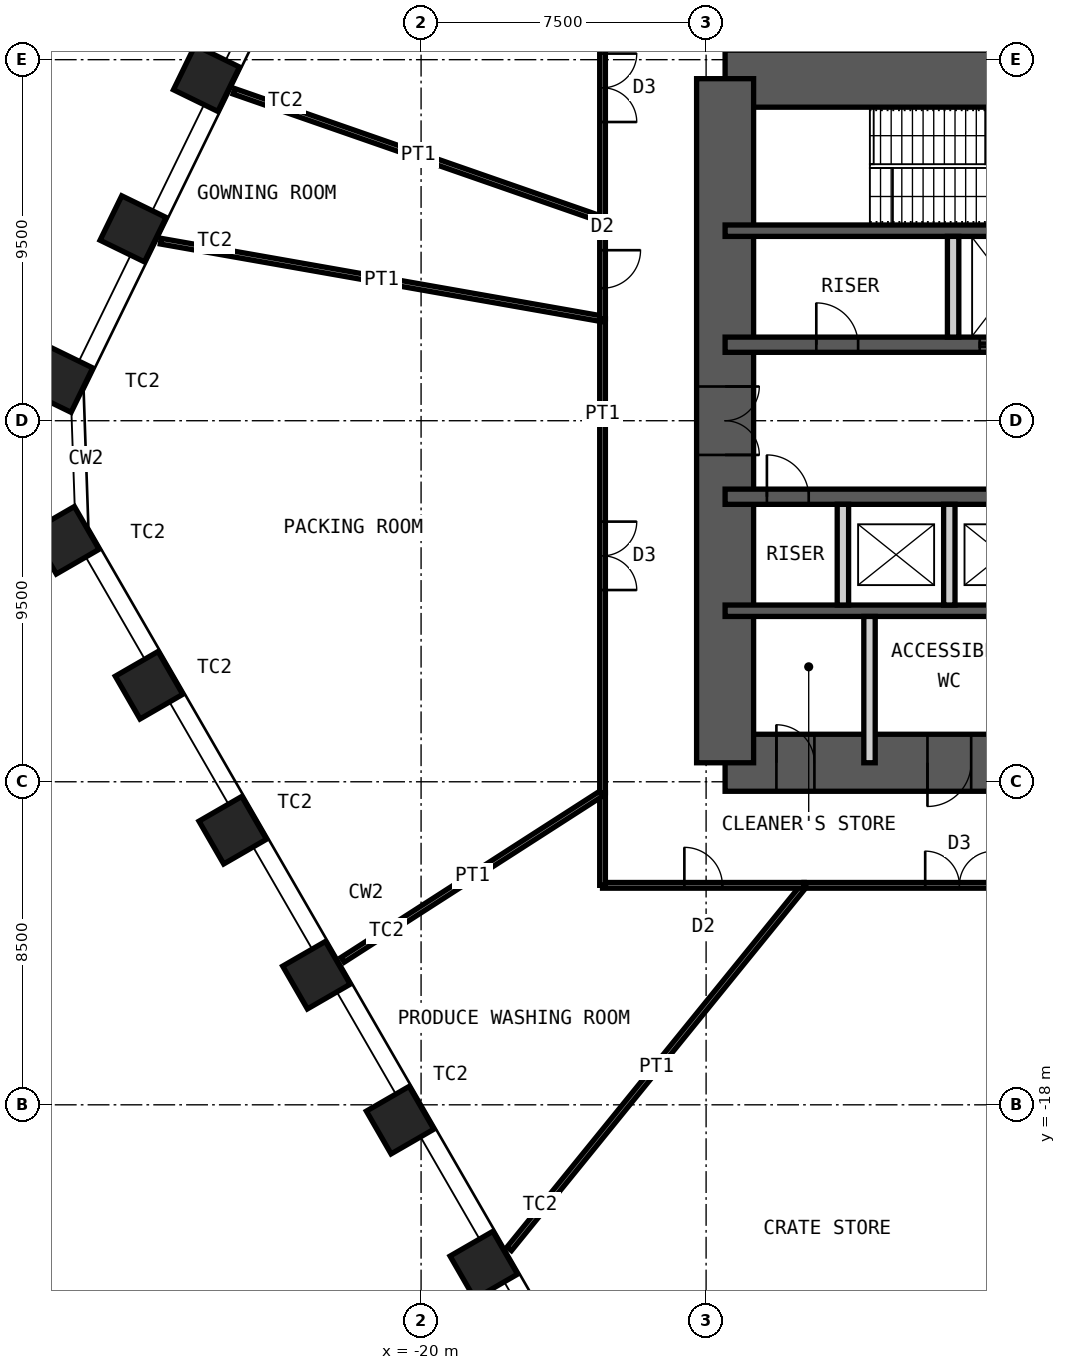
"""IFC4 building model, lengths in metres.
Left out: names, types, materials, properties, quantities, classifications, styles, units other than length and angle.
Written with IfcOpenShell. Run it as: python <this file> out.ifc"""

import sys

from ifc_helpers import new_model, si_unit, direction, frame, frame_2d, origin, origin_2d, place, context, subcontext, project, spatial, rectangle, hollow_rectangle, extrude, element, fill, save


model = new_model("IFC4")
c1 = context("Model", 3, precision=1e-05, world=origin(), true_north=direction((0.0, 1.0)))
c2 = subcontext(c1, "Body", "Model", "MODEL_VIEW")
j1 = project(units=[si_unit("LENGTHUNIT", "METRE"), si_unit("PLANEANGLEUNIT", "RADIAN")], contexts=[c1])
p1 = place(None, origin())
s1 = spatial("IfcSite", under=j1, at=p1, CompositionType="ELEMENT")
p2 = place(p1, origin())
s2 = spatial("IfcBuilding", under=s1, at=p2, CompositionType="ELEMENT")
p3 = place(p2, frame((0.0, 0.0, 87.0)))
s3 = spatial("IfcBuildingStorey", under=s2, at=p3, CompositionType="ELEMENT", Elevation=87.0)
for number, where, z_axis, x_axis in (
    (1, (-18.349, -22.218, 0.0), (0.0, 0.0, 1.0), (0.5, -0.866, 0.0)),
    (2, (-20.552, -18.404, 0.0), (0.0, 0.0, 1.0), (0.5, -0.866, 0.0)),
    (3, (-22.754, -14.589, 0.0), (0.0, 0.0, 1.0), (0.5, -0.866, 0.0)),
    (4, (-24.956, -10.775, 0.0), (0.0, 0.0, 1.0), (0.5, -0.866, 0.0)),
    (5, (-27.158, -6.96, 0.0), (0.0, 0.0, 1.0), (0.5, -0.866, 0.0)),
    (6, (-29.361, -3.146, 0.0), (0.0, 0.0, 1.0), (0.5, -0.866, 0.0)),
    (7, (-29.509, 1.09, 0.0), (0.0, 0.0, 1.0), (-0.438, -0.899, 0.0)),
    (8, (-27.578, 5.049, 0.0), (0.0, 0.0, 1.0), (-0.438, -0.899, 0.0)),
    (9, (-25.647, 9.008, 0.0), (0.0, 0.0, 1.0), (-0.438, -0.899, 0.0)),
):
    element("IfcColumn", number, at=place(p3, frame(where, z_axis=z_axis, x_axis=x_axis)), inside=s3, PredefinedType="COLUMN", context=c2, shape_type="SweptSolid", body=[
        extrude(hollow_rectangle(XDim=1.3, YDim=1.3, WallThickness=0.1, at=origin_2d()), origin(), (0.0, 0.0, 1.0), 5.0),
    ])
p4 = place(p3, frame((-12.0, 9.0, 0.0), z_axis=(0.0, 0.0, 1.0), x_axis=(1.0, 0.0, 0.0)))
e10 = element("IfcWall", 10, at=p4, inside=s3, PredefinedType="SHEAR", context=c2, shape_type="SweptSolid", body=[
    extrude(rectangle(XDim=24.0, YDim=1.5, at=frame_2d((12.0, 0.0))), origin(), (0.0, 0.0, 1.0), 5.0),
])
p5 = place(p4, frame((10.4, 0.0, 0.0)))
e11 = element("IfcOpeningElement", 11, at=p5, cuts=e10, PredefinedType="OPENING", context=c2, shape_type="SweptSolid", body=[
    extrude(rectangle(XDim=1.0, YDim=2.1, at=frame_2d((0.5, 1.05))), frame((0.0, 0.76, 0.0), z_axis=(0.0, -1.0, 0.0), x_axis=(1.0, 0.0, 0.0)), (0.0, 0.0, 1.0), 1.52),
])
p6 = place(p4, frame((17.6, 0.0, 0.0)))
e12 = element("IfcOpeningElement", 12, at=p6, cuts=e10, PredefinedType="OPENING", context=c2, shape_type="SweptSolid", body=[
    extrude(rectangle(XDim=0.9, YDim=2.1, at=frame_2d((0.45, 1.05))), frame((0.0, 0.76, 0.0), z_axis=(0.0, -1.0, 0.0), x_axis=(1.0, 0.0, 0.0)), (0.0, 0.0, 1.0), 1.52),
])
p7 = place(p4, frame((21.9, 0.0, 0.0)))
e13 = element("IfcOpeningElement", 13, at=p7, cuts=e10, PredefinedType="OPENING", context=c2, shape_type="SweptSolid", body=[
    extrude(rectangle(XDim=0.9, YDim=2.1, at=frame_2d((0.45, 1.05))), frame((0.0, 0.76, 0.0), z_axis=(0.0, -1.0, 0.0), x_axis=(1.0, 0.0, 0.0)), (0.0, 0.0, 1.0), 1.52),
])
p8 = place(p3, frame((-12.0, -9.0, 0.0), z_axis=(0.0, 0.0, 1.0), x_axis=(1.0, 0.0, 0.0)))
e14 = element("IfcWall", 14, at=p8, inside=s3, PredefinedType="SHEAR", context=c2, shape_type="SweptSolid", body=[
    extrude(rectangle(XDim=24.0, YDim=1.5, at=frame_2d((12.0, 0.0))), origin(), (0.0, 0.0, 1.0), 5.0),
])
p9 = place(p8, frame((1.35, 0.0, 0.0)))
e15 = element("IfcOpeningElement", 15, at=p9, cuts=e14, PredefinedType="OPENING", context=c2, shape_type="SweptSolid", body=[
    extrude(rectangle(XDim=1.0, YDim=2.1, at=frame_2d((0.5, 1.05))), frame((0.0, 0.76, 0.0), z_axis=(0.0, -1.0, 0.0), x_axis=(1.0, 0.0, 0.0)), (0.0, 0.0, 1.0), 1.52),
])
p10 = place(p8, frame((5.325, 0.0, 0.0)))
e16 = element("IfcOpeningElement", 16, at=p10, cuts=e14, PredefinedType="OPENING", context=c2, shape_type="SweptSolid", body=[
    extrude(rectangle(XDim=1.15, YDim=2.1, at=frame_2d((0.575, 1.05))), frame((0.0, 0.76, 0.0), z_axis=(0.0, -1.0, 0.0), x_axis=(1.0, 0.0, 0.0)), (0.0, 0.0, 1.0), 1.52),
])
p11 = place(p8, frame((12.6, 0.0, 0.0)))
e17 = element("IfcOpeningElement", 17, at=p11, cuts=e14, PredefinedType="OPENING", context=c2, shape_type="SweptSolid", body=[
    extrude(rectangle(XDim=1.0, YDim=2.1, at=frame_2d((0.5, 1.05))), frame((0.0, 0.76, 0.0), z_axis=(0.0, -1.0, 0.0), x_axis=(1.0, 0.0, 0.0)), (0.0, 0.0, 1.0), 1.52),
])
p12 = place(p3, frame((-12.0, -9.0, 0.0), z_axis=(0.0, 0.0, 1.0), x_axis=(0.0, 1.0, 0.0)))
e18 = element("IfcWall", 18, at=p12, inside=s3, PredefinedType="SHEAR", context=c2, shape_type="SweptSolid", body=[
    extrude(rectangle(XDim=18.0, YDim=1.5, at=frame_2d((9.0, 0.0))), origin(), (0.0, 0.0, 1.0), 5.0),
])
p13 = place(p12, frame((8.1, 0.0, 0.0)))
e19 = element("IfcOpeningElement", 19, at=p13, cuts=e18, PredefinedType="OPENING", context=c2, shape_type="SweptSolid", body=[
    extrude(rectangle(XDim=1.8, YDim=2.1, at=frame_2d((0.9, 1.05))), frame((0.0, 0.76, 0.0), z_axis=(0.0, -1.0, 0.0), x_axis=(1.0, 0.0, 0.0)), (0.0, 0.0, 1.0), 1.52),
])
p14 = place(p3, frame((-12.0, 5.0, 0.0), z_axis=(0.0, 0.0, 1.0), x_axis=(1.0, 0.0, 0.0)))
e20 = element("IfcWall", 20, at=p14, inside=s3, PredefinedType="SHEAR", context=c2, shape_type="SweptSolid", body=[
    extrude(rectangle(XDim=24.0, YDim=0.3, at=frame_2d((12.0, 0.0))), origin(), (0.0, 0.0, 1.0), 5.0),
])
p15 = place(p3, frame((-12.0, 2.0, 0.0), z_axis=(0.0, 0.0, 1.0), x_axis=(1.0, 0.0, 0.0)))
e21 = element("IfcWall", 21, at=p15, inside=s3, PredefinedType="SHEAR", context=c2, shape_type="SweptSolid", body=[
    extrude(rectangle(XDim=24.0, YDim=0.4, at=frame_2d((12.0, 0.0))), origin(), (0.0, 0.0, 1.0), 5.0),
])
p16 = place(p15, frame((2.4, 0.0, 0.0)))
e22 = element("IfcOpeningElement", 22, at=p16, cuts=e21, PredefinedType="OPENING", context=c2, shape_type="SweptSolid", body=[
    extrude(rectangle(XDim=1.1, YDim=2.1, at=frame_2d((0.55, 1.05))), frame((0.0, 0.21, 0.0), z_axis=(0.0, -1.0, 0.0), x_axis=(1.0, 0.0, 0.0)), (0.0, 0.0, 1.0), 0.42),
])
p17 = place(p15, frame((22.0, 0.0, 0.0)))
e23 = element("IfcOpeningElement", 23, at=p17, cuts=e21, PredefinedType="OPENING", context=c2, shape_type="SweptSolid", body=[
    extrude(rectangle(XDim=1.1, YDim=2.1, at=frame_2d((0.55, 1.05))), frame((0.0, 0.21, 0.0), z_axis=(0.0, -1.0, 0.0), x_axis=(1.0, 0.0, 0.0)), (0.0, 0.0, 1.0), 0.42),
])
p18 = place(p15, frame((10.15, 0.0, 0.0)))
e24 = element("IfcOpeningElement", 24, at=p18, cuts=e21, PredefinedType="OPENING", context=c2, shape_type="SweptSolid", body=[
    extrude(rectangle(XDim=1.0, YDim=2.1, at=frame_2d((0.5, 1.05))), frame((0.0, 0.21, 0.0), z_axis=(0.0, -1.0, 0.0), x_axis=(1.0, 0.0, 0.0)), (0.0, 0.0, 1.0), 0.42),
])
p19 = place(p15, frame((6.7, 0.0, 0.0)))
e25 = element("IfcOpeningElement", 25, at=p19, cuts=e21, PredefinedType="OPENING", context=c2, shape_type="SweptSolid", body=[
    extrude(rectangle(XDim=1.4, YDim=2.4, at=frame_2d((0.7, 1.2))), frame((0.0, 0.21, 0.0), z_axis=(0.0, -1.0, 0.0), x_axis=(1.0, 0.0, 0.0)), (0.0, 0.0, 1.0), 0.42),
])
p20 = place(p15, frame((13.35, 0.0, 0.0)))
e26 = element("IfcOpeningElement", 26, at=p20, cuts=e21, PredefinedType="OPENING", context=c2, shape_type="SweptSolid", body=[
    extrude(rectangle(XDim=1.1, YDim=2.4, at=frame_2d((0.55, 1.2))), frame((0.0, 0.21, 0.0), z_axis=(0.0, -1.0, 0.0), x_axis=(1.0, 0.0, 0.0)), (0.0, 0.0, 1.0), 0.42),
])
p21 = place(p15, frame((16.15, 0.0, 0.0)))
e27 = element("IfcOpeningElement", 27, at=p21, cuts=e21, PredefinedType="OPENING", context=c2, shape_type="SweptSolid", body=[
    extrude(rectangle(XDim=1.1, YDim=2.4, at=frame_2d((0.55, 1.2))), frame((0.0, 0.21, 0.0), z_axis=(0.0, -1.0, 0.0), x_axis=(1.0, 0.0, 0.0)), (0.0, 0.0, 1.0), 0.42),
])
p22 = place(p15, frame((18.95, 0.0, 0.0)))
e28 = element("IfcOpeningElement", 28, at=p22, cuts=e21, PredefinedType="OPENING", context=c2, shape_type="SweptSolid", body=[
    extrude(rectangle(XDim=1.1, YDim=2.4, at=frame_2d((0.55, 1.2))), frame((0.0, 0.21, 0.0), z_axis=(0.0, -1.0, 0.0), x_axis=(1.0, 0.0, 0.0)), (0.0, 0.0, 1.0), 0.42),
])
p23 = place(p3, frame((-12.0, -2.0, 0.0), z_axis=(0.0, 0.0, 1.0), x_axis=(1.0, 0.0, 0.0)))
e29 = element("IfcWall", 29, at=p23, inside=s3, PredefinedType="SHEAR", context=c2, shape_type="SweptSolid", body=[
    extrude(rectangle(XDim=24.0, YDim=0.4, at=frame_2d((12.0, 0.0))), origin(), (0.0, 0.0, 1.0), 5.0),
])
p24 = place(p23, frame((1.1, 0.0, 0.0)))
e30 = element("IfcOpeningElement", 30, at=p24, cuts=e29, PredefinedType="OPENING", context=c2, shape_type="SweptSolid", body=[
    extrude(rectangle(XDim=1.1, YDim=2.1, at=frame_2d((0.55, 1.05))), frame((0.0, 0.21, 0.0), z_axis=(0.0, -1.0, 0.0), x_axis=(1.0, 0.0, 0.0)), (0.0, 0.0, 1.0), 0.42),
])
p25 = place(p23, frame((13.55, 0.0, 0.0)))
e31 = element("IfcOpeningElement", 31, at=p25, cuts=e29, PredefinedType="OPENING", context=c2, shape_type="SweptSolid", body=[
    extrude(rectangle(XDim=1.1, YDim=2.1, at=frame_2d((0.55, 1.05))), frame((0.0, 0.21, 0.0), z_axis=(0.0, -1.0, 0.0), x_axis=(1.0, 0.0, 0.0)), (0.0, 0.0, 1.0), 0.42),
])
p26 = place(p23, frame((20.7, 0.0, 0.0)))
e32 = element("IfcOpeningElement", 32, at=p26, cuts=e29, PredefinedType="OPENING", context=c2, shape_type="SweptSolid", body=[
    extrude(rectangle(XDim=1.1, YDim=2.1, at=frame_2d((0.55, 1.05))), frame((0.0, 0.21, 0.0), z_axis=(0.0, -1.0, 0.0), x_axis=(1.0, 0.0, 0.0)), (0.0, 0.0, 1.0), 0.42),
])
p27 = place(p3, frame((-12.0, -5.0, 0.0), z_axis=(0.0, 0.0, 1.0), x_axis=(1.0, 0.0, 0.0)))
e33 = element("IfcWall", 33, at=p27, inside=s3, PredefinedType="SHEAR", context=c2, shape_type="SweptSolid", body=[
    extrude(rectangle(XDim=24.0, YDim=0.3, at=frame_2d((12.0, 0.0))), origin(), (0.0, 0.0, 1.0), 5.0),
])
for number, where, z_axis, x_axis in (
    (34, (-6.0, 2.2, 0.0), (0.0, 0.0, 1.0), (0.0, 1.0, 0.0)),
    (35, (-8.9, -4.85, 0.0), (0.0, 0.0, 1.0), (0.0, 1.0, 0.0)),
    (36, (-6.1, -4.85, 0.0), (0.0, 0.0, 1.0), (0.0, 1.0, 0.0)),
):
    element("IfcWall", number, at=place(p3, frame(where, z_axis=z_axis, x_axis=x_axis)), inside=s3, PredefinedType="PARTITIONING", context=c2, shape_type="SweptSolid", body=[
        extrude(rectangle(XDim=2.65, YDim=0.3, at=frame_2d((1.325, 0.0))), origin(), (0.0, 0.0, 1.0), 4.78),
    ])
p28 = place(p3, frame((-8.2, -9.0, 0.0), z_axis=(0.0, 0.0, 1.0), x_axis=(0.0, 1.0, 0.0)))
e37 = element("IfcWall", 37, at=p28, inside=s3, PredefinedType="PARTITIONING", context=c2, shape_type="SweptSolid", body=[
    extrude(rectangle(XDim=3.85, YDim=0.3, at=frame_2d((1.925, 0.0))), origin(), (0.0, 0.0, 1.0), 4.78),
])
p29 = place(p3, frame((-1.751, -12.225, 0.0), z_axis=(0.0, 0.0, 1.0), x_axis=(-1.0, 0.0, 0.0)))
e38 = element("IfcWall", 38, at=p29, inside=s3, PredefinedType="PARTITIONING", context=c2, shape_type="SweptSolid", body=[
    extrude(rectangle(XDim=8.168, YDim=0.15, at=frame_2d((4.084, 0.0))), origin(), (0.0, 0.0, 1.0), 4.8),
])
p30 = place(p29, frame((3.184, 0.0, 0.0)))
e39 = element("IfcOpeningElement", 39, at=p30, cuts=e38, PredefinedType="OPENING", context=c2, shape_type="SweptSolid", body=[
    extrude(rectangle(XDim=1.8, YDim=2.4, at=frame_2d((0.9, 1.2))), frame((0.0, 0.085, 0.0), z_axis=(0.0, -1.0, 0.0), x_axis=(1.0, 0.0, 0.0)), (0.0, 0.0, 1.0), 0.17),
])
p31 = place(p3, frame((-17.68, -21.791, 0.0), z_axis=(0.0, 0.0, 1.0), x_axis=(0.630058221556, 0.776547897718, 0.0)))
e40 = element("IfcWall", 40, at=p31, inside=s3, PredefinedType="PARTITIONING", context=c2, shape_type="SweptSolid", body=[
    extrude(rectangle(XDim=12.318, YDim=0.15, at=frame_2d((6.159, 0.0))), origin(), (0.0, 0.0, 1.0), 3.7),
])
p32 = place(p3, frame((-9.919, -12.225, 0.0), z_axis=(0.0, 0.0, 1.0), x_axis=(-1.0, 0.0, 0.0)))
e41 = element("IfcWall", 41, at=p32, inside=s3, PredefinedType="PARTITIONING", context=c2, shape_type="SweptSolid", body=[
    extrude(rectangle(XDim=5.306, YDim=0.15, at=frame_2d((2.653, 0.0))), origin(), (0.0, 0.0, 1.0), 4.8),
])
p33 = place(p32, frame((2.153, 0.0, 0.0)))
e42 = element("IfcOpeningElement", 42, at=p33, cuts=e41, PredefinedType="OPENING", context=c2, shape_type="SweptSolid", body=[
    extrude(rectangle(XDim=1.0, YDim=2.4, at=frame_2d((0.5, 1.2))), frame((0.0, 0.085, 0.0), z_axis=(0.0, -1.0, 0.0), x_axis=(1.0, 0.0, 0.0)), (0.0, 0.0, 1.0), 0.17),
])
p34 = place(p3, frame((-15.225, -12.225, 0.0), z_axis=(0.0, 0.0, 1.0), x_axis=(0.0, 1.0, 0.0)))
e43 = element("IfcWall", 43, at=p34, inside=s3, PredefinedType="PARTITIONING", context=c2, shape_type="SweptSolid", body=[
    extrude(rectangle(XDim=2.437, YDim=0.15, at=frame_2d((1.218, 0.0))), origin(), (0.0, 0.0, 1.0), 4.8),
])
p35 = place(p3, frame((-22.063, -14.185, 0.0), z_axis=(0.0, 0.0, 1.0), x_axis=(0.8411570088, 0.540790982309, 0.0)))
e44 = element("IfcWall", 44, at=p35, inside=s3, PredefinedType="PARTITIONING", context=c2, shape_type="SweptSolid", body=[
    extrude(rectangle(XDim=8.13, YDim=0.15, at=frame_2d((4.065, 0.0))), origin(), (0.0, 0.0, 1.0), 3.7),
])
p36 = place(p3, frame((-15.225, -9.789, 0.0), z_axis=(0.0, 0.0, 1.0), x_axis=(0.0, 1.0, 0.0)))
e45 = element("IfcWall", 45, at=p36, inside=s3, PredefinedType="PARTITIONING", context=c2, shape_type="SweptSolid", body=[
    extrude(rectangle(XDim=12.468, YDim=0.15, at=frame_2d((6.234, 0.0))), origin(), (0.0, 0.0, 1.0), 4.8),
])
p37 = place(p36, frame((5.334, 0.0, 0.0)))
e46 = element("IfcOpeningElement", 46, at=p37, cuts=e45, PredefinedType="OPENING", context=c2, shape_type="SweptSolid", body=[
    extrude(rectangle(XDim=1.8, YDim=2.4, at=frame_2d((0.9, 1.2))), frame((0.0, 0.085, 0.0), z_axis=(0.0, -1.0, 0.0), x_axis=(1.0, 0.0, 0.0)), (0.0, 0.0, 1.0), 0.17),
])
p38 = place(p3, frame((-26.85, 4.725, 0.0), z_axis=(0.0, 0.0, 1.0), x_axis=(0.984867773441, -0.173307440223, 0.0)))
e47 = element("IfcWall", 47, at=p38, inside=s3, PredefinedType="PARTITIONING", context=c2, shape_type="SweptSolid", body=[
    extrude(rectangle(XDim=11.804, YDim=0.15, at=frame_2d((5.902, 0.0))), origin(), (0.0, 0.0, 1.0), 3.7),
])
p39 = place(p3, frame((-15.225, 2.679, 0.0), z_axis=(0.0, 0.0, 1.0), x_axis=(0.0, 1.0, 0.0)))
e48 = element("IfcWall", 48, at=p39, inside=s3, PredefinedType="PARTITIONING", context=c2, shape_type="SweptSolid", body=[
    extrude(rectangle(XDim=2.616, YDim=0.15, at=frame_2d((1.308, 0.0))), origin(), (0.0, 0.0, 1.0), 4.8),
])
p40 = place(p39, frame((0.808, 0.0, 0.0)))
e49 = element("IfcOpeningElement", 49, at=p40, cuts=e48, PredefinedType="OPENING", context=c2, shape_type="SweptSolid", body=[
    extrude(rectangle(XDim=1.0, YDim=2.4, at=frame_2d((0.5, 1.2))), frame((0.0, 0.085, 0.0), z_axis=(0.0, -1.0, 0.0), x_axis=(1.0, 0.0, 0.0)), (0.0, 0.0, 1.0), 0.17),
])
p41 = place(p3, frame((-24.923, 8.668, 0.0), z_axis=(0.0, 0.0, 1.0), x_axis=(0.944504494796, -0.328498492098, 0.0)))
e50 = element("IfcWall", 50, at=p41, inside=s3, PredefinedType="PARTITIONING", context=c2, shape_type="SweptSolid", body=[
    extrude(rectangle(XDim=10.268, YDim=0.15, at=frame_2d((5.134, 0.0))), origin(), (0.0, 0.0, 1.0), 3.7),
])
p42 = place(p3, frame((-15.225, 5.295, 0.0), z_axis=(0.0, 0.0, 1.0), x_axis=(0.0, 1.0, 0.0)))
e51 = element("IfcWall", 51, at=p42, inside=s3, PredefinedType="PARTITIONING", context=c2, shape_type="SweptSolid", body=[
    extrude(rectangle(XDim=6.93, YDim=0.15, at=frame_2d((3.465, 0.0))), origin(), (0.0, 0.0, 1.0), 4.8),
])
p43 = place(p42, frame((2.565, 0.0, 0.0)))
e52 = element("IfcOpeningElement", 52, at=p43, cuts=e51, PredefinedType="OPENING", context=c2, shape_type="SweptSolid", body=[
    extrude(rectangle(XDim=1.8, YDim=2.4, at=frame_2d((0.9, 1.2))), frame((0.0, 0.085, 0.0), z_axis=(0.0, -1.0, 0.0), x_axis=(1.0, 0.0, 0.0)), (0.0, 0.0, 1.0), 0.17),
])
p44 = place(p9, origin())
e53 = element("IfcDoor", 53, at=p44, inside=s3, OperationType="SINGLE_SWING_RIGHT", PredefinedType="DOOR", context=c2, shape_type="SweptSolid", body=[
    extrude(rectangle(XDim=1.0, YDim=2.1, at=frame_2d((0.5, 1.05))), frame((0.0, 0.025, 0.0), z_axis=(0.0, -1.0, 0.0), x_axis=(1.0, 0.0, 0.0)), (0.0, 0.0, 1.0), 0.05),
])
fill(e15, e53)
p45 = place(p10, origin())
e54 = element("IfcDoor", 54, at=p45, inside=s3, OperationType="SINGLE_SWING_LEFT", PredefinedType="DOOR", context=c2, shape_type="SweptSolid", body=[
    extrude(rectangle(XDim=1.15, YDim=2.1, at=frame_2d((0.575, 1.05))), frame((0.0, 0.025, 0.0), z_axis=(0.0, -1.0, 0.0), x_axis=(1.0, 0.0, 0.0)), (0.0, 0.0, 1.0), 0.05),
])
fill(e16, e54)
p46 = place(p16, origin())
e55 = element("IfcDoor", 55, at=p46, inside=s3, OperationType="SINGLE_SWING_RIGHT", PredefinedType="DOOR", context=c2, shape_type="SweptSolid", body=[
    extrude(rectangle(XDim=1.1, YDim=2.1, at=frame_2d((0.55, 1.05))), frame((0.0, 0.025, 0.0), z_axis=(0.0, -1.0, 0.0), x_axis=(1.0, 0.0, 0.0)), (0.0, 0.0, 1.0), 0.05),
])
fill(e22, e55)
p47 = place(p24, origin())
e56 = element("IfcDoor", 56, at=p47, inside=s3, OperationType="SINGLE_SWING_RIGHT", PredefinedType="DOOR", context=c2, shape_type="SweptSolid", body=[
    extrude(rectangle(XDim=1.1, YDim=2.1, at=frame_2d((0.55, 1.05))), frame((0.0, 0.025, 0.0), z_axis=(0.0, -1.0, 0.0), x_axis=(1.0, 0.0, 0.0)), (0.0, 0.0, 1.0), 0.05),
])
fill(e30, e56)
p48 = place(p13, origin())
e57 = element("IfcDoor", 57, at=p48, inside=s3, OperationType="DOUBLE_DOOR_DOUBLE_SWING", PredefinedType="DOOR", context=c2, shape_type="SweptSolid", body=[
    extrude(rectangle(XDim=1.8, YDim=2.1, at=frame_2d((0.9, 1.05))), frame((0.0, 0.025, 0.0), z_axis=(0.0, -1.0, 0.0), x_axis=(1.0, 0.0, 0.0)), (0.0, 0.0, 1.0), 0.05),
])
fill(e19, e57)
p49 = place(p19, origin())
e58 = element("IfcDoor", 58, at=p49, inside=s3, OperationType="DOUBLE_DOOR_SLIDING", PredefinedType="DOOR", context=c2, shape_type="SweptSolid", body=[
    extrude(rectangle(XDim=1.4, YDim=2.4, at=frame_2d((0.7, 1.2))), frame((0.0, 0.025, 0.0), z_axis=(0.0, -1.0, 0.0), x_axis=(1.0, 0.0, 0.0)), (0.0, 0.0, 1.0), 0.05),
])
fill(e25, e58)
p50 = place(p30, origin())
e59 = element("IfcDoor", 59, at=p50, inside=s3, OperationType="DOUBLE_DOOR_DOUBLE_SWING", PredefinedType="DOOR", context=c2, shape_type="SweptSolid", body=[
    extrude(rectangle(XDim=1.8, YDim=2.4, at=frame_2d((0.9, 1.2))), frame((0.0, 0.025, 0.0), z_axis=(0.0, -1.0, 0.0), x_axis=(1.0, 0.0, 0.0)), (0.0, 0.0, 1.0), 0.05),
])
fill(e39, e59)
p51 = place(p33, origin())
e60 = element("IfcDoor", 60, at=p51, inside=s3, OperationType="SINGLE_SWING_RIGHT", PredefinedType="DOOR", context=c2, shape_type="SweptSolid", body=[
    extrude(rectangle(XDim=1.0, YDim=2.4, at=frame_2d((0.5, 1.2))), frame((0.0, 0.025, 0.0), z_axis=(0.0, -1.0, 0.0), x_axis=(1.0, 0.0, 0.0)), (0.0, 0.0, 1.0), 0.05),
])
fill(e42, e60)
p52 = place(p37, origin())
e61 = element("IfcDoor", 61, at=p52, inside=s3, OperationType="DOUBLE_DOOR_DOUBLE_SWING", PredefinedType="DOOR", context=c2, shape_type="SweptSolid", body=[
    extrude(rectangle(XDim=1.8, YDim=2.4, at=frame_2d((0.9, 1.2))), frame((0.0, 0.025, 0.0), z_axis=(0.0, -1.0, 0.0), x_axis=(1.0, 0.0, 0.0)), (0.0, 0.0, 1.0), 0.05),
])
fill(e46, e61)
p53 = place(p40, origin())
e62 = element("IfcDoor", 62, at=p53, inside=s3, OperationType="SINGLE_SWING_RIGHT", PredefinedType="DOOR", context=c2, shape_type="SweptSolid", body=[
    extrude(rectangle(XDim=1.0, YDim=2.4, at=frame_2d((0.5, 1.2))), frame((0.0, 0.025, 0.0), z_axis=(0.0, -1.0, 0.0), x_axis=(1.0, 0.0, 0.0)), (0.0, 0.0, 1.0), 0.05),
])
fill(e49, e62)
p54 = place(p43, origin())
e63 = element("IfcDoor", 63, at=p54, inside=s3, OperationType="DOUBLE_DOOR_DOUBLE_SWING", PredefinedType="DOOR", context=c2, shape_type="SweptSolid", body=[
    extrude(rectangle(XDim=1.8, YDim=2.4, at=frame_2d((0.9, 1.2))), frame((0.0, 0.025, 0.0), z_axis=(0.0, -1.0, 0.0), x_axis=(1.0, 0.0, 0.0)), (0.0, 0.0, 1.0), 0.05),
])
fill(e52, e63)
save(model, sys.argv[1])
